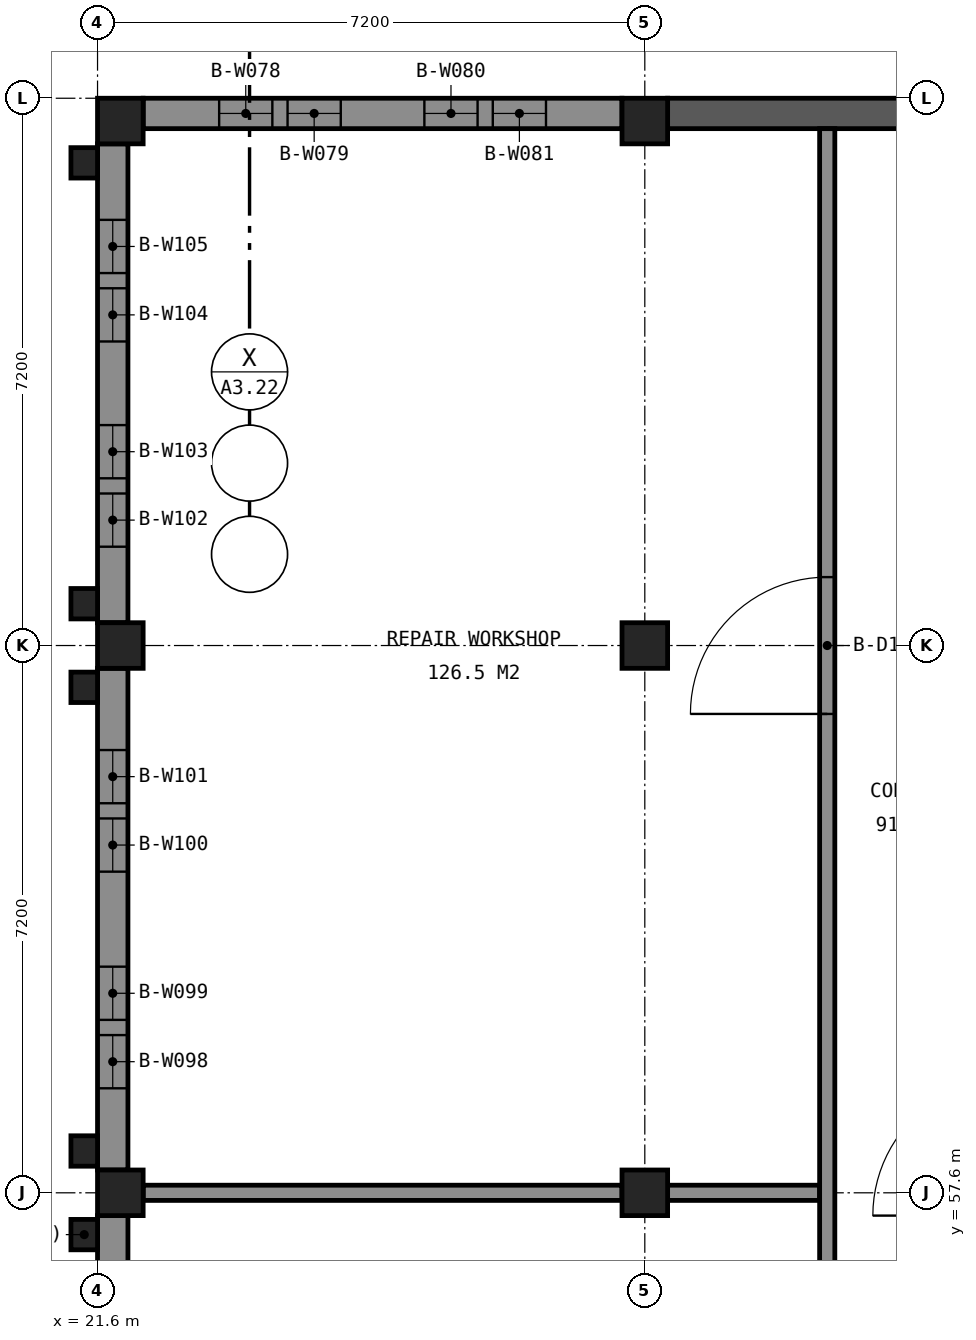
"""IFC4 building model, lengths in metres.
Left out: names, types, materials, properties, quantities, classifications, styles, units other than length and angle.
Written with IfcOpenShell. Run it as: python <this file> out.ifc"""

import sys

from ifc_helpers import new_model, si_unit, direction, frame, frame_2d, origin, origin_2d, place, context, subcontext, project, spatial, rectangle, extrude, element, fill, save


model = new_model("IFC4")
c1 = context("Model", 3, precision=1e-05, world=origin(), true_north=direction((0.0, 1.0)))
c2 = subcontext(c1, "Body", "Model", "MODEL_VIEW")
j1 = project(units=[si_unit("LENGTHUNIT", "METRE"), si_unit("PLANEANGLEUNIT", "RADIAN")], contexts=[c1])
p1 = place(None, origin())
s1 = spatial("IfcSite", under=j1, at=p1, CompositionType="ELEMENT")
p2 = place(p1, origin())
s2 = spatial("IfcBuilding", under=s1, at=p2, CompositionType="ELEMENT")
p3 = place(p2, frame((0.0, 0.0, 4.8)))
s3 = spatial("IfcBuildingStorey", under=s2, at=p3, CompositionType="ELEMENT", Elevation=4.8)
for number, where, z_axis, x_axis in (
    (1, (21.9, 57.6, 0.0), (0.0, 0.0, 1.0), (1.0, 0.0, 0.0)),
    (2, (21.9, 64.8, 0.0), (0.0, 0.0, 1.0), (1.0, 0.0, 0.0)),
    (3, (21.9, 71.7, 0.0), (0.0, 0.0, 1.0), (1.0, 0.0, 0.0)),
    (4, (28.8, 57.6, 0.0), (0.0, 0.0, 1.0), (1.0, 0.0, 0.0)),
    (5, (28.8, 64.8, 0.0), (0.0, 0.0, 1.0), (1.0, 0.0, 0.0)),
    (6, (28.8, 71.7, 0.0), (0.0, 0.0, 1.0), (1.0, 0.0, 0.0)),
):
    element("IfcColumn", number, at=place(p3, frame(where, z_axis=z_axis, x_axis=x_axis)), inside=s3, PredefinedType="COLUMN", context=c2, shape_type="SweptSolid", body=[
        extrude(rectangle(XDim=0.6, YDim=0.6, at=origin_2d()), origin(), (0.0, 0.0, 1.0), 4.8),
    ])
p4 = place(p3, frame((29.1, 71.8, 0.0), z_axis=(0.0, 0.0, 1.0), x_axis=(1.0, 0.0, 0.0)))
e7 = element("IfcWall", 7, at=p4, inside=s3, PredefinedType="SHEAR", context=c2, shape_type="SweptSolid", body=[
    extrude(rectangle(XDim=13.7, YDim=0.4, at=frame_2d((6.85, 0.0))), origin(), (0.0, 0.0, 1.0), 4.55),
])
p5 = place(p3, frame((22.2, 71.8, 0.0), z_axis=(0.0, 0.0, 1.0), x_axis=(1.0, 0.0, 0.0)))
e8 = element("IfcWall", 8, at=p5, inside=s3, PredefinedType="SOLIDWALL", context=c2, shape_type="SweptSolid", body=[
    extrude(rectangle(XDim=6.3, YDim=0.4, at=frame_2d((3.15, 0.0))), origin(), (0.0, 0.0, 1.0), 3.95),
])
p6 = place(p5, frame((1.0, 0.0, 0.9)))
e9 = element("IfcOpeningElement", 9, at=p6, cuts=e8, PredefinedType="OPENING", context=c2, shape_type="SweptSolid", body=[
    extrude(rectangle(XDim=0.7, YDim=2.4, at=frame_2d((0.35, 1.2))), frame((0.0, 0.21, 0.0), z_axis=(0.0, -1.0, 0.0), x_axis=(1.0, 0.0, 0.0)), (0.0, 0.0, 1.0), 0.42),
])
p7 = place(p5, frame((1.9, 0.0, 0.9)))
e10 = element("IfcOpeningElement", 10, at=p7, cuts=e8, PredefinedType="OPENING", context=c2, shape_type="SweptSolid", body=[
    extrude(rectangle(XDim=0.7, YDim=2.4, at=frame_2d((0.35, 1.2))), frame((0.0, 0.21, 0.0), z_axis=(0.0, -1.0, 0.0), x_axis=(1.0, 0.0, 0.0)), (0.0, 0.0, 1.0), 0.42),
])
p8 = place(p5, frame((3.7, 0.0, 0.9)))
e11 = element("IfcOpeningElement", 11, at=p8, cuts=e8, PredefinedType="OPENING", context=c2, shape_type="SweptSolid", body=[
    extrude(rectangle(XDim=0.7, YDim=2.4, at=frame_2d((0.35, 1.2))), frame((0.0, 0.21, 0.0), z_axis=(0.0, -1.0, 0.0), x_axis=(1.0, 0.0, 0.0)), (0.0, 0.0, 1.0), 0.42),
])
p9 = place(p5, frame((4.6, 0.0, 0.9)))
e12 = element("IfcOpeningElement", 12, at=p9, cuts=e8, PredefinedType="OPENING", context=c2, shape_type="SweptSolid", body=[
    extrude(rectangle(XDim=0.7, YDim=2.4, at=frame_2d((0.35, 1.2))), frame((0.0, 0.21, 0.0), z_axis=(0.0, -1.0, 0.0), x_axis=(1.0, 0.0, 0.0)), (0.0, 0.0, 1.0), 0.42),
])
p10 = place(p3, frame((21.8, 50.7, 0.0), z_axis=(0.0, 0.0, 1.0), x_axis=(0.0, 1.0, 0.0)))
e13 = element("IfcWall", 13, at=p10, inside=s3, PredefinedType="SOLIDWALL", context=c2, shape_type="SweptSolid", body=[
    extrude(rectangle(XDim=6.6, YDim=0.4, at=frame_2d((3.3, 0.0))), origin(), (0.0, 0.0, 1.0), 3.95),
])
p11 = place(p10, frame((1.075, 0.0, 0.9)))
e14 = element("IfcOpeningElement", 14, at=p11, cuts=e13, PredefinedType="OPENING", context=c2, shape_type="SweptSolid", body=[
    extrude(rectangle(XDim=0.7, YDim=2.4, at=frame_2d((0.35, 1.2))), frame((0.0, 0.21, 0.0), z_axis=(0.0, -1.0, 0.0), x_axis=(1.0, 0.0, 0.0)), (0.0, 0.0, 1.0), 0.42),
])
p12 = place(p10, frame((1.975, 0.0, 0.9)))
e15 = element("IfcOpeningElement", 15, at=p12, cuts=e13, PredefinedType="OPENING", context=c2, shape_type="SweptSolid", body=[
    extrude(rectangle(XDim=0.7, YDim=2.4, at=frame_2d((0.35, 1.2))), frame((0.0, 0.21, 0.0), z_axis=(0.0, -1.0, 0.0), x_axis=(1.0, 0.0, 0.0)), (0.0, 0.0, 1.0), 0.42),
])
p13 = place(p10, frame((3.925, 0.0, 0.9)))
e16 = element("IfcOpeningElement", 16, at=p13, cuts=e13, PredefinedType="OPENING", context=c2, shape_type="SweptSolid", body=[
    extrude(rectangle(XDim=0.7, YDim=2.4, at=frame_2d((0.35, 1.2))), frame((0.0, 0.21, 0.0), z_axis=(0.0, -1.0, 0.0), x_axis=(1.0, 0.0, 0.0)), (0.0, 0.0, 1.0), 0.42),
])
p14 = place(p10, frame((4.825, 0.0, 0.9)))
e17 = element("IfcOpeningElement", 17, at=p14, cuts=e13, PredefinedType="OPENING", context=c2, shape_type="SweptSolid", body=[
    extrude(rectangle(XDim=0.7, YDim=2.4, at=frame_2d((0.35, 1.2))), frame((0.0, 0.21, 0.0), z_axis=(0.0, -1.0, 0.0), x_axis=(1.0, 0.0, 0.0)), (0.0, 0.0, 1.0), 0.42),
])
p15 = place(p3, frame((21.8, 57.9, 0.0), z_axis=(0.0, 0.0, 1.0), x_axis=(0.0, 1.0, 0.0)))
e18 = element("IfcWall", 18, at=p15, inside=s3, PredefinedType="SOLIDWALL", context=c2, shape_type="SweptSolid", body=[
    extrude(rectangle(XDim=6.6, YDim=0.4, at=frame_2d((3.3, 0.0))), origin(), (0.0, 0.0, 1.0), 3.95),
])
p16 = place(p15, frame((1.075, 0.0, 0.9)))
e19 = element("IfcOpeningElement", 19, at=p16, cuts=e18, PredefinedType="OPENING", context=c2, shape_type="SweptSolid", body=[
    extrude(rectangle(XDim=0.7, YDim=2.4, at=frame_2d((0.35, 1.2))), frame((0.0, 0.21, 0.0), z_axis=(0.0, -1.0, 0.0), x_axis=(1.0, 0.0, 0.0)), (0.0, 0.0, 1.0), 0.42),
])
p17 = place(p15, frame((1.975, 0.0, 0.9)))
e20 = element("IfcOpeningElement", 20, at=p17, cuts=e18, PredefinedType="OPENING", context=c2, shape_type="SweptSolid", body=[
    extrude(rectangle(XDim=0.7, YDim=2.4, at=frame_2d((0.35, 1.2))), frame((0.0, 0.21, 0.0), z_axis=(0.0, -1.0, 0.0), x_axis=(1.0, 0.0, 0.0)), (0.0, 0.0, 1.0), 0.42),
])
p18 = place(p15, frame((3.925, 0.0, 0.9)))
e21 = element("IfcOpeningElement", 21, at=p18, cuts=e18, PredefinedType="OPENING", context=c2, shape_type="SweptSolid", body=[
    extrude(rectangle(XDim=0.7, YDim=2.4, at=frame_2d((0.35, 1.2))), frame((0.0, 0.21, 0.0), z_axis=(0.0, -1.0, 0.0), x_axis=(1.0, 0.0, 0.0)), (0.0, 0.0, 1.0), 0.42),
])
p19 = place(p15, frame((4.825, 0.0, 0.9)))
e22 = element("IfcOpeningElement", 22, at=p19, cuts=e18, PredefinedType="OPENING", context=c2, shape_type="SweptSolid", body=[
    extrude(rectangle(XDim=0.7, YDim=2.4, at=frame_2d((0.35, 1.2))), frame((0.0, 0.21, 0.0), z_axis=(0.0, -1.0, 0.0), x_axis=(1.0, 0.0, 0.0)), (0.0, 0.0, 1.0), 0.42),
])
p20 = place(p3, frame((21.8, 65.1, 0.0), z_axis=(0.0, 0.0, 1.0), x_axis=(0.0, 1.0, 0.0)))
e23 = element("IfcWall", 23, at=p20, inside=s3, PredefinedType="SOLIDWALL", context=c2, shape_type="SweptSolid", body=[
    extrude(rectangle(XDim=6.3, YDim=0.4, at=frame_2d((3.15, 0.0))), origin(), (0.0, 0.0, 1.0), 3.95),
])
p21 = place(p20, frame((1.0, 0.0, 0.9)))
e24 = element("IfcOpeningElement", 24, at=p21, cuts=e23, PredefinedType="OPENING", context=c2, shape_type="SweptSolid", body=[
    extrude(rectangle(XDim=0.7, YDim=2.4, at=frame_2d((0.35, 1.2))), frame((0.0, 0.21, 0.0), z_axis=(0.0, -1.0, 0.0), x_axis=(1.0, 0.0, 0.0)), (0.0, 0.0, 1.0), 0.42),
])
p22 = place(p20, frame((1.9, 0.0, 0.9)))
e25 = element("IfcOpeningElement", 25, at=p22, cuts=e23, PredefinedType="OPENING", context=c2, shape_type="SweptSolid", body=[
    extrude(rectangle(XDim=0.7, YDim=2.4, at=frame_2d((0.35, 1.2))), frame((0.0, 0.21, 0.0), z_axis=(0.0, -1.0, 0.0), x_axis=(1.0, 0.0, 0.0)), (0.0, 0.0, 1.0), 0.42),
])
p23 = place(p20, frame((3.7, 0.0, 0.9)))
e26 = element("IfcOpeningElement", 26, at=p23, cuts=e23, PredefinedType="OPENING", context=c2, shape_type="SweptSolid", body=[
    extrude(rectangle(XDim=0.7, YDim=2.4, at=frame_2d((0.35, 1.2))), frame((0.0, 0.21, 0.0), z_axis=(0.0, -1.0, 0.0), x_axis=(1.0, 0.0, 0.0)), (0.0, 0.0, 1.0), 0.42),
])
p24 = place(p20, frame((4.6, 0.0, 0.9)))
e27 = element("IfcOpeningElement", 27, at=p24, cuts=e23, PredefinedType="OPENING", context=c2, shape_type="SweptSolid", body=[
    extrude(rectangle(XDim=0.7, YDim=2.4, at=frame_2d((0.35, 1.2))), frame((0.0, 0.21, 0.0), z_axis=(0.0, -1.0, 0.0), x_axis=(1.0, 0.0, 0.0)), (0.0, 0.0, 1.0), 0.42),
])
for number, where, z_axis, x_axis in (
    (28, (21.425, 57.05, 0.0), (0.0, 0.0, 1.0), (1.0, 0.0, 0.0)),
    (29, (21.425, 58.15, 0.0), (0.0, 0.0, 1.0), (1.0, 0.0, 0.0)),
    (30, (21.425, 64.25, 0.0), (0.0, 0.0, 1.0), (1.0, 0.0, 0.0)),
    (31, (21.425, 65.35, 0.0), (0.0, 0.0, 1.0), (1.0, 0.0, 0.0)),
    (32, (21.425, 71.15, 0.0), (0.0, 0.0, 1.0), (1.0, 0.0, 0.0)),
):
    element("IfcColumn", number, at=place(p3, frame(where, z_axis=z_axis, x_axis=x_axis)), inside=s3, PredefinedType="COLUMN", context=c2, shape_type="SweptSolid", body=[
        extrude(rectangle(XDim=0.35, YDim=0.4, at=origin_2d()), origin(), (0.0, 0.0, 1.0), 4.8),
    ])
p25 = place(p3, frame((22.2, 57.6, 0.0), z_axis=(0.0, 0.0, 1.0), x_axis=(1.0, 0.0, 0.0)))
e33 = element("IfcWall", 33, at=p25, inside=s3, PredefinedType="PARTITIONING", context=c2, shape_type="SweptSolid", body=[
    extrude(rectangle(XDim=6.3, YDim=0.2, at=frame_2d((3.15, 0.0))), origin(), (0.0, 0.0, 1.0), 3.95),
])
p26 = place(p3, frame((29.1, 57.6, 0.0), z_axis=(0.0, 0.0, 1.0), x_axis=(1.0, 0.0, 0.0)))
e34 = element("IfcWall", 34, at=p26, inside=s3, PredefinedType="PARTITIONING", context=c2, shape_type="SweptSolid", body=[
    extrude(rectangle(XDim=2.0, YDim=0.2, at=frame_2d((1.0, 0.0))), origin(), (0.0, 0.0, 1.0), 3.95),
])
p27 = place(p3, frame((31.2, 29.2, 0.0), z_axis=(0.0, 0.0, 1.0), x_axis=(0.0, 1.0, 0.0)))
e35 = element("IfcWall", 35, at=p27, inside=s3, PredefinedType="PARTITIONING", context=c2, shape_type="SweptSolid", body=[
    extrude(rectangle(XDim=42.4, YDim=0.2, at=frame_2d((21.2, 0.0))), origin(), (0.0, 0.0, 1.0), 3.95),
])
p28 = place(p27, frame((5.9, 0.0, 0.0)))
e36 = element("IfcOpeningElement", 36, at=p28, cuts=e35, PredefinedType="OPENING", context=c2, shape_type="SweptSolid", body=[
    extrude(rectangle(XDim=1.8, YDim=2.1, at=frame_2d((0.9, 1.05))), frame((0.0, 0.11, 0.0), z_axis=(0.0, -1.0, 0.0), x_axis=(1.0, 0.0, 0.0)), (0.0, 0.0, 1.0), 0.22),
])
p29 = place(p27, frame((20.3, 0.0, 0.0)))
e37 = element("IfcOpeningElement", 37, at=p29, cuts=e35, PredefinedType="OPENING", context=c2, shape_type="SweptSolid", body=[
    extrude(rectangle(XDim=1.8, YDim=2.1, at=frame_2d((0.9, 1.05))), frame((0.0, 0.11, 0.0), z_axis=(0.0, -1.0, 0.0), x_axis=(1.0, 0.0, 0.0)), (0.0, 0.0, 1.0), 0.22),
])
p30 = place(p27, frame((34.7, 0.0, 0.0)))
e38 = element("IfcOpeningElement", 38, at=p30, cuts=e35, PredefinedType="OPENING", context=c2, shape_type="SweptSolid", body=[
    extrude(rectangle(XDim=1.8, YDim=2.1, at=frame_2d((0.9, 1.05))), frame((0.0, 0.11, 0.0), z_axis=(0.0, -1.0, 0.0), x_axis=(1.0, 0.0, 0.0)), (0.0, 0.0, 1.0), 0.22),
])
p31 = place(p6, origin())
e39 = element("IfcWindow", 39, at=p31, inside=s3, PartitioningType="SINGLE_PANEL", PredefinedType="WINDOW", context=c2, shape_type="SweptSolid", body=[
    extrude(rectangle(XDim=0.7, YDim=2.4, at=frame_2d((0.35, 1.2))), frame((0.0, 0.03, 0.0), z_axis=(0.0, -1.0, 0.0), x_axis=(1.0, 0.0, 0.0)), (0.0, 0.0, 1.0), 0.06),
])
fill(e9, e39)
p32 = place(p7, origin())
e40 = element("IfcWindow", 40, at=p32, inside=s3, PartitioningType="SINGLE_PANEL", PredefinedType="WINDOW", context=c2, shape_type="SweptSolid", body=[
    extrude(rectangle(XDim=0.7, YDim=2.4, at=frame_2d((0.35, 1.2))), frame((0.0, 0.03, 0.0), z_axis=(0.0, -1.0, 0.0), x_axis=(1.0, 0.0, 0.0)), (0.0, 0.0, 1.0), 0.06),
])
fill(e10, e40)
p33 = place(p8, origin())
e41 = element("IfcWindow", 41, at=p33, inside=s3, PartitioningType="SINGLE_PANEL", PredefinedType="WINDOW", context=c2, shape_type="SweptSolid", body=[
    extrude(rectangle(XDim=0.7, YDim=2.4, at=frame_2d((0.35, 1.2))), frame((0.0, 0.03, 0.0), z_axis=(0.0, -1.0, 0.0), x_axis=(1.0, 0.0, 0.0)), (0.0, 0.0, 1.0), 0.06),
])
fill(e11, e41)
p34 = place(p9, origin())
e42 = element("IfcWindow", 42, at=p34, inside=s3, PartitioningType="SINGLE_PANEL", PredefinedType="WINDOW", context=c2, shape_type="SweptSolid", body=[
    extrude(rectangle(XDim=0.7, YDim=2.4, at=frame_2d((0.35, 1.2))), frame((0.0, 0.03, 0.0), z_axis=(0.0, -1.0, 0.0), x_axis=(1.0, 0.0, 0.0)), (0.0, 0.0, 1.0), 0.06),
])
fill(e12, e42)
p35 = place(p16, origin())
e43 = element("IfcWindow", 43, at=p35, inside=s3, PartitioningType="SINGLE_PANEL", PredefinedType="WINDOW", context=c2, shape_type="SweptSolid", body=[
    extrude(rectangle(XDim=0.7, YDim=2.4, at=frame_2d((0.35, 1.2))), frame((0.0, 0.03, 0.0), z_axis=(0.0, -1.0, 0.0), x_axis=(1.0, 0.0, 0.0)), (0.0, 0.0, 1.0), 0.06),
])
fill(e19, e43)
p36 = place(p17, origin())
e44 = element("IfcWindow", 44, at=p36, inside=s3, PartitioningType="SINGLE_PANEL", PredefinedType="WINDOW", context=c2, shape_type="SweptSolid", body=[
    extrude(rectangle(XDim=0.7, YDim=2.4, at=frame_2d((0.35, 1.2))), frame((0.0, 0.03, 0.0), z_axis=(0.0, -1.0, 0.0), x_axis=(1.0, 0.0, 0.0)), (0.0, 0.0, 1.0), 0.06),
])
fill(e20, e44)
p37 = place(p18, origin())
e45 = element("IfcWindow", 45, at=p37, inside=s3, PartitioningType="SINGLE_PANEL", PredefinedType="WINDOW", context=c2, shape_type="SweptSolid", body=[
    extrude(rectangle(XDim=0.7, YDim=2.4, at=frame_2d((0.35, 1.2))), frame((0.0, 0.03, 0.0), z_axis=(0.0, -1.0, 0.0), x_axis=(1.0, 0.0, 0.0)), (0.0, 0.0, 1.0), 0.06),
])
fill(e21, e45)
p38 = place(p19, origin())
e46 = element("IfcWindow", 46, at=p38, inside=s3, PartitioningType="SINGLE_PANEL", PredefinedType="WINDOW", context=c2, shape_type="SweptSolid", body=[
    extrude(rectangle(XDim=0.7, YDim=2.4, at=frame_2d((0.35, 1.2))), frame((0.0, 0.03, 0.0), z_axis=(0.0, -1.0, 0.0), x_axis=(1.0, 0.0, 0.0)), (0.0, 0.0, 1.0), 0.06),
])
fill(e22, e46)
p39 = place(p21, origin())
e47 = element("IfcWindow", 47, at=p39, inside=s3, PartitioningType="SINGLE_PANEL", PredefinedType="WINDOW", context=c2, shape_type="SweptSolid", body=[
    extrude(rectangle(XDim=0.7, YDim=2.4, at=frame_2d((0.35, 1.2))), frame((0.0, 0.03, 0.0), z_axis=(0.0, -1.0, 0.0), x_axis=(1.0, 0.0, 0.0)), (0.0, 0.0, 1.0), 0.06),
])
fill(e24, e47)
p40 = place(p22, origin())
e48 = element("IfcWindow", 48, at=p40, inside=s3, PartitioningType="SINGLE_PANEL", PredefinedType="WINDOW", context=c2, shape_type="SweptSolid", body=[
    extrude(rectangle(XDim=0.7, YDim=2.4, at=frame_2d((0.35, 1.2))), frame((0.0, 0.03, 0.0), z_axis=(0.0, -1.0, 0.0), x_axis=(1.0, 0.0, 0.0)), (0.0, 0.0, 1.0), 0.06),
])
fill(e25, e48)
p41 = place(p23, origin())
e49 = element("IfcWindow", 49, at=p41, inside=s3, PartitioningType="SINGLE_PANEL", PredefinedType="WINDOW", context=c2, shape_type="SweptSolid", body=[
    extrude(rectangle(XDim=0.7, YDim=2.4, at=frame_2d((0.35, 1.2))), frame((0.0, 0.03, 0.0), z_axis=(0.0, -1.0, 0.0), x_axis=(1.0, 0.0, 0.0)), (0.0, 0.0, 1.0), 0.06),
])
fill(e26, e49)
p42 = place(p24, origin())
e50 = element("IfcWindow", 50, at=p42, inside=s3, PartitioningType="SINGLE_PANEL", PredefinedType="WINDOW", context=c2, shape_type="SweptSolid", body=[
    extrude(rectangle(XDim=0.7, YDim=2.4, at=frame_2d((0.35, 1.2))), frame((0.0, 0.03, 0.0), z_axis=(0.0, -1.0, 0.0), x_axis=(1.0, 0.0, 0.0)), (0.0, 0.0, 1.0), 0.06),
])
fill(e27, e50)
p43 = place(p30, origin())
e51 = element("IfcDoor", 51, at=p43, inside=s3, OperationType="DOUBLE_DOOR_DOUBLE_SWING", PredefinedType="DOOR", context=c2, shape_type="SweptSolid", body=[
    extrude(rectangle(XDim=1.8, YDim=2.1, at=frame_2d((0.9, 1.05))), frame((0.0, 0.025, 0.0), z_axis=(0.0, -1.0, 0.0), x_axis=(1.0, 0.0, 0.0)), (0.0, 0.0, 1.0), 0.05),
])
fill(e38, e51)
save(model, sys.argv[1])
